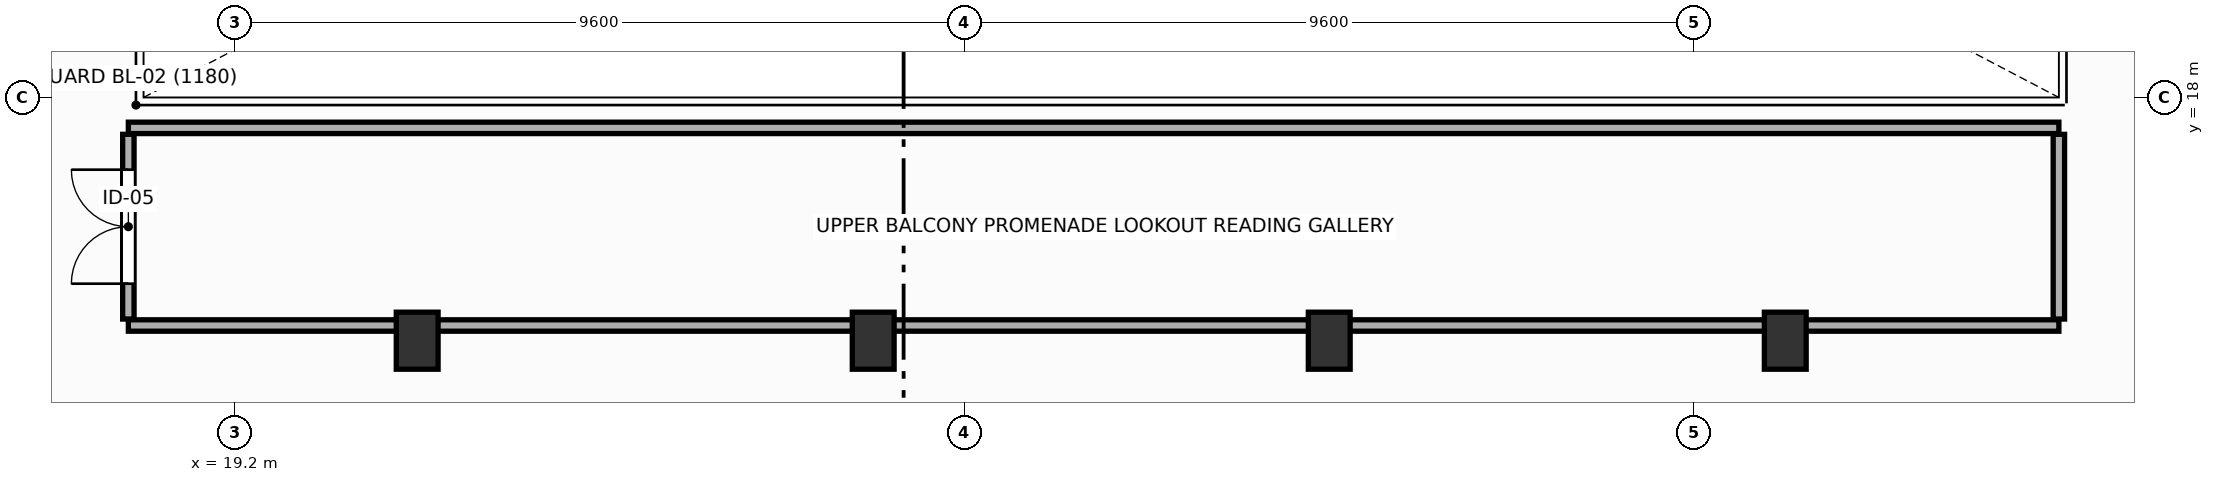
"""IFC4 building model, lengths in metres.
Left out: names, types, materials, properties, quantities, classifications, styles, units other than length and angle.
Written with IfcOpenShell. Run it as: python <this file> out.ifc"""

import sys

from ifc_helpers import new_model, si_unit, direction, frame, frame_2d, origin, origin_2d, place, context, subcontext, project, spatial, rectangle, extrude, element, fill, save


model = new_model("IFC4")
c1 = context("Model", 3, precision=1e-05, world=origin(), true_north=direction((0.0, 1.0)))
c2 = subcontext(c1, "Body", "Model", "MODEL_VIEW")
j1 = project(units=[si_unit("LENGTHUNIT", "METRE"), si_unit("PLANEANGLEUNIT", "RADIAN")], contexts=[c1])
p1 = place(None, origin())
s1 = spatial("IfcSite", under=j1, at=p1, CompositionType="ELEMENT")
p2 = place(p1, origin())
s2 = spatial("IfcBuilding", under=s1, at=p2, CompositionType="ELEMENT")
p3 = place(p2, frame((0.0, 0.0, 9.9)))
s3 = spatial("IfcBuildingStorey", under=s2, at=p3, CompositionType="ELEMENT", Elevation=9.9)
for number, where, z_axis, x_axis in (
    (1, (21.6, 14.8, 0.0), (0.0, 0.0, 1.0), (1.0, 0.0, 0.0)),
    (2, (27.6, 14.8, 0.0), (0.0, 0.0, 1.0), (1.0, 0.0, 0.0)),
    (3, (33.6, 14.8, 0.0), (0.0, 0.0, 1.0), (1.0, 0.0, 0.0)),
    (4, (39.6, 14.8, 0.0), (0.0, 0.0, 1.0), (1.0, 0.0, 0.0)),
):
    element("IfcColumn", number, at=place(p3, frame(where, z_axis=z_axis, x_axis=x_axis)), inside=s3, PredefinedType="COLUMN", context=c2, shape_type="SweptSolid", body=[
        extrude(rectangle(XDim=0.55, YDim=0.75, at=origin_2d()), origin(), (0.0, 0.0, 1.0), 4.5),
    ])
p4 = place(p3, frame((17.8, 17.6, 0.0), z_axis=(0.0, 0.0, 1.0), x_axis=(1.0, 0.0, 0.0)))
e5 = element("IfcWall", 5, at=p4, inside=s3, PredefinedType="PARTITIONING", context=c2, shape_type="SweptSolid", body=[
    extrude(rectangle(XDim=25.4, YDim=0.15, at=frame_2d((12.7, 0.0))), origin(), (0.0, 0.0, 1.0), 4.235),
])
p5 = place(p3, frame((43.2, 15.0, 0.0), z_axis=(0.0, 0.0, 1.0), x_axis=(-1.0, 0.0, 0.0)))
e6 = element("IfcWall", 6, at=p5, inside=s3, PredefinedType="PARTITIONING", context=c2, shape_type="SweptSolid", body=[
    extrude(rectangle(XDim=25.4, YDim=0.15, at=frame_2d((12.7, 0.0))), origin(), (0.0, 0.0, 1.0), 3.68),
])
p6 = place(p3, frame((17.8, 15.085, 0.0), z_axis=(0.0, 0.0, 1.0), x_axis=(0.0, 1.0, 0.0)))
e7 = element("IfcWall", 7, at=p6, inside=s3, PredefinedType="PARTITIONING", context=c2, shape_type="SweptSolid", body=[
    extrude(rectangle(XDim=2.43, YDim=0.15, at=frame_2d((1.215, 0.0))), origin(), (0.0, 0.0, 1.0), 3.68),
])
p7 = place(p6, frame((0.465, 0.0, 0.0)))
e8 = element("IfcOpeningElement", 8, at=p7, cuts=e7, PredefinedType="OPENING", context=c2, shape_type="SweptSolid", body=[
    extrude(rectangle(XDim=1.5, YDim=2.35, at=frame_2d((0.75, 1.175))), frame((0.0, 0.085, 0.0), z_axis=(0.0, -1.0, 0.0), x_axis=(1.0, 0.0, 0.0)), (0.0, 0.0, 1.0), 0.17),
])
p8 = place(p3, frame((43.2, 17.515, 0.0), z_axis=(0.0, 0.0, 1.0), x_axis=(0.0, -1.0, 0.0)))
e9 = element("IfcWall", 9, at=p8, inside=s3, PredefinedType="PARTITIONING", context=c2, shape_type="SweptSolid", body=[
    extrude(rectangle(XDim=2.43, YDim=0.15, at=frame_2d((1.215, 0.0))), origin(), (0.0, 0.0, 1.0), 3.68),
])
p9 = place(p7, origin())
e10 = element("IfcDoor", 10, at=p9, inside=s3, OperationType="DOUBLE_DOOR_SINGLE_SWING", PredefinedType="DOOR", context=c2, shape_type="SweptSolid", body=[
    extrude(rectangle(XDim=1.5, YDim=2.35, at=frame_2d((0.75, 1.175))), frame((0.0, 0.025, 0.0), z_axis=(0.0, -1.0, 0.0), x_axis=(1.0, 0.0, 0.0)), (0.0, 0.0, 1.0), 0.05),
])
fill(e8, e10)
save(model, sys.argv[1])
